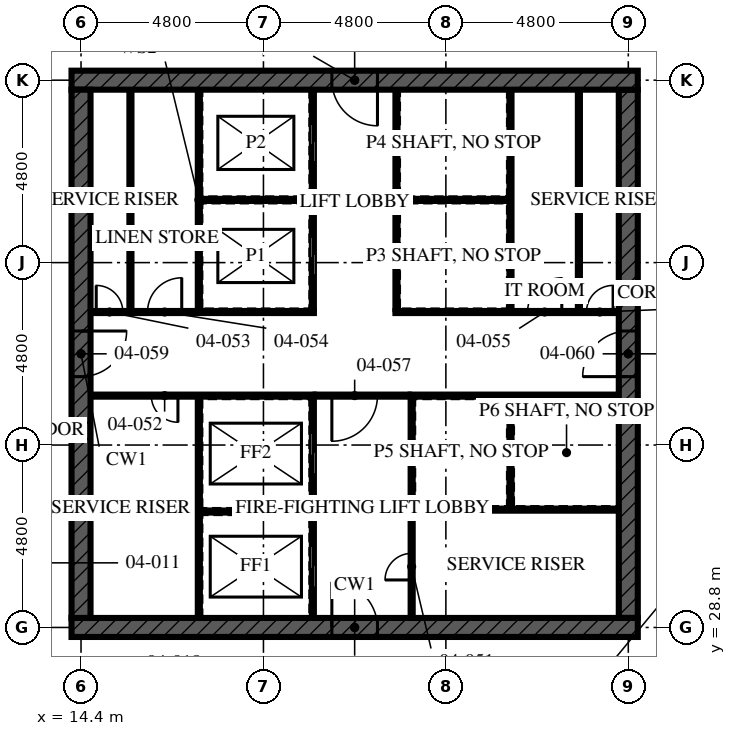
"""IFC4 building model, lengths in metres.
Left out: names, types, materials, properties, quantities, classifications, styles, units other than length and angle.
Written with IfcOpenShell. Run it as: python <this file> out.ifc"""

import sys

from ifc_helpers import new_model, si_unit, direction, frame, frame_2d, origin, place, context, subcontext, project, spatial, rectangle, extrude, element, fill, save


model = new_model("IFC4")
c1 = context("Model", 3, precision=1e-05, world=origin(), true_north=direction((0.0, 1.0)))
c2 = subcontext(c1, "Body", "Model", "MODEL_VIEW")
j1 = project(units=[si_unit("LENGTHUNIT", "METRE"), si_unit("PLANEANGLEUNIT", "RADIAN")], contexts=[c1])
p1 = place(None, origin())
s1 = spatial("IfcSite", under=j1, at=p1, CompositionType="ELEMENT")
p2 = place(p1, origin())
s2 = spatial("IfcBuilding", under=s1, at=p2, CompositionType="ELEMENT")
p3 = place(p2, frame((0.0, 0.0, 18.0)))
s3 = spatial("IfcBuildingStorey", under=s2, at=p3, CompositionType="ELEMENT", Elevation=18.0)
p4 = place(p3, frame((14.15, 28.8, -0.17), z_axis=(0.0, 0.0, 1.0), x_axis=(1.0, 0.0, 0.0)))
e1 = element("IfcWall", 1, at=p4, inside=s3, PredefinedType="SHEAR", context=c2, shape_type="SweptSolid", body=[
    extrude(rectangle(XDim=14.9, YDim=0.5, at=frame_2d((7.45, 0.0))), origin(), (0.0, 0.0, 1.0), 4.5),
])
p5 = place(p4, frame((6.85, 0.0, 0.17)))
e2 = element("IfcOpeningElement", 2, at=p5, cuts=e1, PredefinedType="OPENING", context=c2, shape_type="SweptSolid", body=[
    extrude(rectangle(XDim=1.2, YDim=2.1, at=frame_2d((0.6, 1.05))), frame((0.0, 0.26, 0.0), z_axis=(0.0, -1.0, 0.0), x_axis=(1.0, 0.0, 0.0)), (0.0, 0.0, 1.0), 0.521),
])
p6 = place(p3, frame((29.05, 43.2, -0.17), z_axis=(0.0, 0.0, 1.0), x_axis=(-1.0, 0.0, 0.0)))
e3 = element("IfcWall", 3, at=p6, inside=s3, PredefinedType="SHEAR", context=c2, shape_type="SweptSolid", body=[
    extrude(rectangle(XDim=14.9, YDim=0.5, at=frame_2d((7.45, 0.0))), origin(), (0.0, 0.0, 1.0), 4.5),
])
p7 = place(p6, frame((6.85, 0.0, 0.17)))
e4 = element("IfcOpeningElement", 4, at=p7, cuts=e3, PredefinedType="OPENING", context=c2, shape_type="SweptSolid", body=[
    extrude(rectangle(XDim=1.2, YDim=2.1, at=frame_2d((0.6, 1.05))), frame((0.0, 0.26, 0.0), z_axis=(0.0, -1.0, 0.0), x_axis=(1.0, 0.0, 0.0)), (0.0, 0.0, 1.0), 0.521),
])
p8 = place(p3, frame((14.4, 42.95, -0.17), z_axis=(0.0, 0.0, 1.0), x_axis=(0.0, -1.0, 0.0)))
e5 = element("IfcWall", 5, at=p8, inside=s3, PredefinedType="SHEAR", context=c2, shape_type="SweptSolid", body=[
    extrude(rectangle(XDim=13.9, YDim=0.5, at=frame_2d((6.95, 0.0))), origin(), (0.0, 0.0, 1.0), 4.5),
])
p9 = place(p8, frame((6.35, 0.0, 0.17)))
e6 = element("IfcOpeningElement", 6, at=p9, cuts=e5, PredefinedType="OPENING", context=c2, shape_type="SweptSolid", body=[
    extrude(rectangle(XDim=1.2, YDim=2.1, at=frame_2d((0.6, 1.05))), frame((0.0, 0.26, 0.0), z_axis=(0.0, -1.0, 0.0), x_axis=(1.0, 0.0, 0.0)), (0.0, 0.0, 1.0), 0.521),
])
p10 = place(p3, frame((28.8, 29.05, -0.17), z_axis=(0.0, 0.0, 1.0), x_axis=(0.0, 1.0, 0.0)))
e7 = element("IfcWall", 7, at=p10, inside=s3, PredefinedType="SHEAR", context=c2, shape_type="SweptSolid", body=[
    extrude(rectangle(XDim=13.9, YDim=0.5, at=frame_2d((6.95, 0.0))), origin(), (0.0, 0.0, 1.0), 4.5),
])
p11 = place(p10, frame((6.35, 0.0, 0.17)))
e8 = element("IfcOpeningElement", 8, at=p11, cuts=e7, PredefinedType="OPENING", context=c2, shape_type="SweptSolid", body=[
    extrude(rectangle(XDim=1.2, YDim=2.1, at=frame_2d((0.6, 1.05))), frame((0.0, 0.26, 0.0), z_axis=(0.0, -1.0, 0.0), x_axis=(1.0, 0.0, 0.0)), (0.0, 0.0, 1.0), 0.521),
])
for number, where, z_axis, x_axis in (
    (9, (15.7, 37.15, 0.0), (0.0, 0.0, 1.0), (0.0, 1.0, 0.0)),
    (10, (27.5, 37.15, 0.0), (0.0, 0.0, 1.0), (0.0, 1.0, 0.0)),
):
    element("IfcWall", number, at=place(p3, frame(where, z_axis=z_axis, x_axis=x_axis)), inside=s3, PredefinedType="SOLIDWALL", context=c2, shape_type="SweptSolid", body=[
        extrude(rectangle(XDim=5.8, YDim=0.1, at=frame_2d((2.9, 0.0))), origin(), (0.0, 0.0, 1.0), 4.33),
    ])
p12 = place(p3, frame((20.5, 29.05, 0.0), z_axis=(0.0, 0.0, 1.0), x_axis=(0.0, 1.0, 0.0)))
e11 = element("IfcWall", 11, at=p12, inside=s3, PredefinedType="SOLIDWALL", context=c2, shape_type="SweptSolid", body=[
    extrude(rectangle(XDim=5.8, YDim=0.1, at=frame_2d((2.9, 0.0))), origin(), (0.0, 0.0, 1.0), 4.33),
])
p13 = place(p12, frame((0.8, 0.0, 0.0)))
e12 = element("IfcOpeningElement", 12, at=p13, cuts=e11, PredefinedType="OPENING", context=c2, shape_type="SweptSolid", body=[
    extrude(rectangle(XDim=1.1, YDim=2.3, at=frame_2d((0.55, 1.15))), frame((0.0, 0.061, 0.0), z_axis=(0.0, -1.0, 0.0), x_axis=(1.0, 0.0, 0.0)), (0.0, 0.0, 1.0), 0.121),
])
p14 = place(p12, frame((3.775, 0.0, 0.0)))
e13 = element("IfcOpeningElement", 13, at=p14, cuts=e11, PredefinedType="OPENING", context=c2, shape_type="SweptSolid", body=[
    extrude(rectangle(XDim=1.1, YDim=2.3, at=frame_2d((0.55, 1.15))), frame((0.0, 0.061, 0.0), z_axis=(0.0, -1.0, 0.0), x_axis=(1.0, 0.0, 0.0)), (0.0, 0.0, 1.0), 0.121),
])
p15 = place(p3, frame((20.5, 37.15, 0.0), z_axis=(0.0, 0.0, 1.0), x_axis=(0.0, 1.0, 0.0)))
e14 = element("IfcWall", 14, at=p15, inside=s3, PredefinedType="SOLIDWALL", context=c2, shape_type="SweptSolid", body=[
    extrude(rectangle(XDim=5.8, YDim=0.1, at=frame_2d((2.9, 0.0))), origin(), (0.0, 0.0, 1.0), 4.33),
])
p16 = place(p15, frame((0.925, 0.0, 0.0)))
e15 = element("IfcOpeningElement", 15, at=p16, cuts=e14, PredefinedType="OPENING", context=c2, shape_type="SweptSolid", body=[
    extrude(rectangle(XDim=1.0, YDim=2.1, at=frame_2d((0.5, 1.05))), frame((0.0, 0.061, 0.0), z_axis=(0.0, -1.0, 0.0), x_axis=(1.0, 0.0, 0.0)), (0.0, 0.0, 1.0), 0.121),
])
p17 = place(p15, frame((3.9, 0.0, 0.0)))
e16 = element("IfcOpeningElement", 16, at=p17, cuts=e14, PredefinedType="OPENING", context=c2, shape_type="SweptSolid", body=[
    extrude(rectangle(XDim=1.0, YDim=2.1, at=frame_2d((0.5, 1.05))), frame((0.0, 0.061, 0.0), z_axis=(0.0, -1.0, 0.0), x_axis=(1.0, 0.0, 0.0)), (0.0, 0.0, 1.0), 0.121),
])
p18 = place(p3, frame((22.7, 37.15, 0.0), z_axis=(0.0, 0.0, 1.0), x_axis=(0.0, 1.0, 0.0)))
e17 = element("IfcWall", 17, at=p18, inside=s3, PredefinedType="SOLIDWALL", context=c2, shape_type="SweptSolid", body=[
    extrude(rectangle(XDim=5.8, YDim=0.1, at=frame_2d((2.9, 0.0))), origin(), (0.0, 0.0, 1.0), 4.33),
])
p19 = place(p3, frame((23.1, 29.05, 0.0), z_axis=(0.0, 0.0, 1.0), x_axis=(0.0, 1.0, 0.0)))
e18 = element("IfcWall", 18, at=p19, inside=s3, PredefinedType="SOLIDWALL", context=c2, shape_type="SweptSolid", body=[
    extrude(rectangle(XDim=5.8, YDim=0.1, at=frame_2d((2.9, 0.0))), origin(), (0.0, 0.0, 1.0), 4.33),
])
p20 = place(p19, frame((1.0, 0.0, 0.0)))
e19 = element("IfcOpeningElement", 19, at=p20, cuts=e18, PredefinedType="OPENING", context=c2, shape_type="SweptSolid", body=[
    extrude(rectangle(XDim=0.7, YDim=2.1, at=frame_2d((0.35, 1.05))), frame((0.0, 0.061, 0.0), z_axis=(0.0, -1.0, 0.0), x_axis=(1.0, 0.0, 0.0)), (0.0, 0.0, 1.0), 0.121),
])
p21 = place(p3, frame((14.65, 34.9, 0.0), z_axis=(0.0, 0.0, 1.0), x_axis=(1.0, 0.0, 0.0)))
e20 = element("IfcWall", 20, at=p21, inside=s3, PredefinedType="SOLIDWALL", context=c2, shape_type="SweptSolid", body=[
    extrude(rectangle(XDim=5.9, YDim=0.1, at=frame_2d((2.95, 0.0))), origin(), (0.0, 0.0, 1.0), 4.33),
])
p22 = place(p21, frame((1.6, 0.0, 0.0)))
e21 = element("IfcOpeningElement", 21, at=p22, cuts=e20, PredefinedType="OPENING", context=c2, shape_type="SweptSolid", body=[
    extrude(rectangle(XDim=0.7, YDim=2.1, at=frame_2d((0.35, 1.05))), frame((0.0, 0.061, 0.0), z_axis=(0.0, -1.0, 0.0), x_axis=(1.0, 0.0, 0.0)), (0.0, 0.0, 1.0), 0.121),
])
p23 = place(p3, frame((23.05, 34.9, 0.0), z_axis=(0.0, 0.0, 1.0), x_axis=(1.0, 0.0, 0.0)))
e22 = element("IfcWall", 22, at=p23, inside=s3, PredefinedType="SOLIDWALL", context=c2, shape_type="SweptSolid", body=[
    extrude(rectangle(XDim=5.5, YDim=0.1, at=frame_2d((2.75, 0.0))), origin(), (0.0, 0.0, 1.0), 4.33),
])
p24 = place(p3, frame((14.65, 37.1, 0.0), z_axis=(0.0, 0.0, 1.0), x_axis=(1.0, 0.0, 0.0)))
e23 = element("IfcWall", 23, at=p24, inside=s3, PredefinedType="SOLIDWALL", context=c2, shape_type="SweptSolid", body=[
    extrude(rectangle(XDim=5.9, YDim=0.1, at=frame_2d((2.95, 0.0))), origin(), (0.0, 0.0, 1.0), 4.33),
])
p25 = place(p24, frame((0.15, 0.0, 0.0)))
e24 = element("IfcOpeningElement", 24, at=p25, cuts=e23, PredefinedType="OPENING", context=c2, shape_type="SweptSolid", body=[
    extrude(rectangle(XDim=0.7, YDim=2.1, at=frame_2d((0.35, 1.05))), frame((0.0, 0.061, 0.0), z_axis=(0.0, -1.0, 0.0), x_axis=(1.0, 0.0, 0.0)), (0.0, 0.0, 1.0), 0.121),
])
p26 = place(p24, frame((1.5, 0.0, 0.0)))
e25 = element("IfcOpeningElement", 25, at=p26, cuts=e23, PredefinedType="OPENING", context=c2, shape_type="SweptSolid", body=[
    extrude(rectangle(XDim=0.9, YDim=2.1, at=frame_2d((0.45, 1.05))), frame((0.0, 0.061, 0.0), z_axis=(0.0, -1.0, 0.0), x_axis=(1.0, 0.0, 0.0)), (0.0, 0.0, 1.0), 0.121),
])
p27 = place(p3, frame((22.65, 37.1, 0.0), z_axis=(0.0, 0.0, 1.0), x_axis=(1.0, 0.0, 0.0)))
e26 = element("IfcWall", 26, at=p27, inside=s3, PredefinedType="SOLIDWALL", context=c2, shape_type="SweptSolid", body=[
    extrude(rectangle(XDim=5.9, YDim=0.1, at=frame_2d((2.95, 0.0))), origin(), (0.0, 0.0, 1.0), 4.33),
])
p28 = place(p27, frame((3.5, 0.0, 0.0)))
e27 = element("IfcOpeningElement", 27, at=p28, cuts=e26, PredefinedType="OPENING", context=c2, shape_type="SweptSolid", body=[
    extrude(rectangle(XDim=0.9, YDim=2.1, at=frame_2d((0.45, 1.05))), frame((0.0, 0.061, 0.0), z_axis=(0.0, -1.0, 0.0), x_axis=(1.0, 0.0, 0.0)), (0.0, 0.0, 1.0), 0.121),
])
p29 = place(p27, frame((5.05, 0.0, 0.0)))
e28 = element("IfcOpeningElement", 28, at=p29, cuts=e26, PredefinedType="OPENING", context=c2, shape_type="SweptSolid", body=[
    extrude(rectangle(XDim=0.7, YDim=2.1, at=frame_2d((0.35, 1.05))), frame((0.0, 0.061, 0.0), z_axis=(0.0, -1.0, 0.0), x_axis=(1.0, 0.0, 0.0)), (0.0, 0.0, 1.0), 0.121),
])
p30 = place(p3, frame((20.55, 34.9, 0.0), z_axis=(0.0, 0.0, 1.0), x_axis=(1.0, 0.0, 0.0)))
e29 = element("IfcWall", 29, at=p30, inside=s3, PredefinedType="SOLIDWALL", context=c2, shape_type="SweptSolid", body=[
    extrude(rectangle(XDim=2.5, YDim=0.1, at=frame_2d((1.25, 0.0))), origin(), (0.0, 0.0, 1.0), 4.33),
])
p31 = place(p30, frame((0.45, 0.0, 0.0)))
e30 = element("IfcOpeningElement", 30, at=p31, cuts=e29, PredefinedType="OPENING", context=c2, shape_type="SweptSolid", body=[
    extrude(rectangle(XDim=1.2, YDim=2.1, at=frame_2d((0.6, 1.05))), frame((0.0, 0.061, 0.0), z_axis=(0.0, -1.0, 0.0), x_axis=(1.0, 0.0, 0.0)), (0.0, 0.0, 1.0), 0.121),
])
p32 = place(p3, frame((17.5, 29.05, 0.0), z_axis=(0.0, 0.0, 1.0), x_axis=(0.0, 1.0, 0.0)))
e31 = element("IfcWall", 31, at=p32, inside=s3, PredefinedType="SOLIDWALL", context=c2, shape_type="SweptSolid", body=[
    extrude(rectangle(XDim=5.8, YDim=0.1, at=frame_2d((2.9, 0.0))), origin(), (0.0, 0.0, 1.0), 4.33),
])
p33 = place(p3, frame((17.55, 31.85, 0.0), z_axis=(0.0, 0.0, 1.0), x_axis=(1.0, 0.0, 0.0)))
e32 = element("IfcWall", 32, at=p33, inside=s3, PredefinedType="SOLIDWALL", context=c2, shape_type="SweptSolid", body=[
    extrude(rectangle(XDim=2.9, YDim=0.1, at=frame_2d((1.45, 0.0))), origin(), (0.0, 0.0, 1.0), 4.33),
])
p34 = place(p3, frame((17.5, 37.15, 0.0), z_axis=(0.0, 0.0, 1.0), x_axis=(0.0, 1.0, 0.0)))
e33 = element("IfcWall", 33, at=p34, inside=s3, PredefinedType="SOLIDWALL", context=c2, shape_type="SweptSolid", body=[
    extrude(rectangle(XDim=5.8, YDim=0.1, at=frame_2d((2.9, 0.0))), origin(), (0.0, 0.0, 1.0), 4.33),
])
for number, where, z_axis, x_axis in (
    (34, (17.55, 40.05, 0.0), (0.0, 0.0, 1.0), (1.0, 0.0, 0.0)),
    (35, (22.75, 40.05, 0.0), (0.0, 0.0, 1.0), (1.0, 0.0, 0.0)),
):
    element("IfcWall", number, at=place(p3, frame(where, z_axis=z_axis, x_axis=x_axis)), inside=s3, PredefinedType="SOLIDWALL", context=c2, shape_type="SweptSolid", body=[
        extrude(rectangle(XDim=2.9, YDim=0.1, at=frame_2d((1.45, 0.0))), origin(), (0.0, 0.0, 1.0), 4.33),
    ])
p35 = place(p3, frame((25.7, 37.15, 0.0), z_axis=(0.0, 0.0, 1.0), x_axis=(0.0, 1.0, 0.0)))
e36 = element("IfcWall", 36, at=p35, inside=s3, PredefinedType="SOLIDWALL", context=c2, shape_type="SweptSolid", body=[
    extrude(rectangle(XDim=5.8, YDim=0.1, at=frame_2d((2.9, 0.0))), origin(), (0.0, 0.0, 1.0), 4.33),
])
p36 = place(p3, frame((25.7, 31.95, 0.0), z_axis=(0.0, 0.0, 1.0), x_axis=(0.0, 1.0, 0.0)))
e37 = element("IfcWall", 37, at=p36, inside=s3, PredefinedType="SOLIDWALL", context=c2, shape_type="SweptSolid", body=[
    extrude(rectangle(XDim=2.9, YDim=0.1, at=frame_2d((1.45, 0.0))), origin(), (0.0, 0.0, 1.0), 4.33),
])
p37 = place(p3, frame((23.15, 31.9, 0.0), z_axis=(0.0, 0.0, 1.0), x_axis=(1.0, 0.0, 0.0)))
e38 = element("IfcWall", 38, at=p37, inside=s3, PredefinedType="SOLIDWALL", context=c2, shape_type="SweptSolid", body=[
    extrude(rectangle(XDim=5.4, YDim=0.1, at=frame_2d((2.7, 0.0))), origin(), (0.0, 0.0, 1.0), 4.33),
])
p38 = place(p13, origin())
e39 = element("IfcDoor", 39, at=p38, inside=s3, OperationType="SLIDING_TO_LEFT", PredefinedType="DOOR", context=c2, shape_type="SweptSolid", body=[
    extrude(rectangle(XDim=1.1, YDim=2.3, at=frame_2d((0.55, 1.15))), frame((0.0, 0.05, 0.0), z_axis=(0.0, -1.0, 0.0), x_axis=(1.0, 0.0, 0.0)), (0.0, 0.0, 1.0), 0.1),
])
fill(e12, e39)
p39 = place(p14, origin())
e40 = element("IfcDoor", 40, at=p39, inside=s3, OperationType="SLIDING_TO_LEFT", PredefinedType="DOOR", context=c2, shape_type="SweptSolid", body=[
    extrude(rectangle(XDim=1.1, YDim=2.3, at=frame_2d((0.55, 1.15))), frame((0.0, 0.05, 0.0), z_axis=(0.0, -1.0, 0.0), x_axis=(1.0, 0.0, 0.0)), (0.0, 0.0, 1.0), 0.1),
])
fill(e13, e40)
p40 = place(p16, origin())
e41 = element("IfcDoor", 41, at=p40, inside=s3, OperationType="SLIDING_TO_LEFT", PredefinedType="DOOR", context=c2, shape_type="SweptSolid", body=[
    extrude(rectangle(XDim=1.0, YDim=2.1, at=frame_2d((0.5, 1.05))), frame((0.0, 0.05, 0.0), z_axis=(0.0, -1.0, 0.0), x_axis=(1.0, 0.0, 0.0)), (0.0, 0.0, 1.0), 0.1),
])
fill(e15, e41)
p41 = place(p17, origin())
e42 = element("IfcDoor", 42, at=p41, inside=s3, OperationType="SLIDING_TO_LEFT", PredefinedType="DOOR", context=c2, shape_type="SweptSolid", body=[
    extrude(rectangle(XDim=1.0, YDim=2.1, at=frame_2d((0.5, 1.05))), frame((0.0, 0.05, 0.0), z_axis=(0.0, -1.0, 0.0), x_axis=(1.0, 0.0, 0.0)), (0.0, 0.0, 1.0), 0.1),
])
fill(e16, e42)
p42 = place(p20, origin())
e43 = element("IfcDoor", 43, at=p42, inside=s3, OperationType="SINGLE_SWING_RIGHT", PredefinedType="DOOR", context=c2, shape_type="SweptSolid", body=[
    extrude(rectangle(XDim=0.7, YDim=2.1, at=frame_2d((0.35, 1.05))), frame((0.0, 0.027, 0.0), z_axis=(0.0, -1.0, 0.0), x_axis=(1.0, 0.0, 0.0)), (0.0, 0.0, 1.0), 0.054),
])
fill(e19, e43)
p43 = place(p22, frame((0.7, 0.0, 0.0), z_axis=(0.0, 0.0, 1.0), x_axis=(-1.0, 0.0, 0.0)))
e44 = element("IfcDoor", 44, at=p43, inside=s3, OperationType="SINGLE_SWING_RIGHT", PredefinedType="DOOR", context=c2, shape_type="SweptSolid", body=[
    extrude(rectangle(XDim=0.7, YDim=2.1, at=frame_2d((0.35, 1.05))), frame((0.0, 0.027, 0.0), z_axis=(0.0, -1.0, 0.0), x_axis=(1.0, 0.0, 0.0)), (0.0, 0.0, 1.0), 0.054),
])
fill(e21, e44)
p44 = place(p25, origin())
e45 = element("IfcDoor", 45, at=p44, inside=s3, OperationType="SINGLE_SWING_RIGHT", PredefinedType="DOOR", context=c2, shape_type="SweptSolid", body=[
    extrude(rectangle(XDim=0.7, YDim=2.1, at=frame_2d((0.35, 1.05))), frame((0.0, 0.027, 0.0), z_axis=(0.0, -1.0, 0.0), x_axis=(1.0, 0.0, 0.0)), (0.0, 0.0, 1.0), 0.054),
])
fill(e24, e45)
p45 = place(p26, origin())
e46 = element("IfcDoor", 46, at=p45, inside=s3, OperationType="SINGLE_SWING_LEFT", PredefinedType="DOOR", context=c2, shape_type="SweptSolid", body=[
    extrude(rectangle(XDim=0.9, YDim=2.1, at=frame_2d((0.45, 1.05))), frame((0.0, 0.027, 0.0), z_axis=(0.0, -1.0, 0.0), x_axis=(1.0, 0.0, 0.0)), (0.0, 0.0, 1.0), 0.054),
])
fill(e25, e46)
p46 = place(p28, origin())
e47 = element("IfcDoor", 47, at=p46, inside=s3, OperationType="SINGLE_SWING_LEFT", PredefinedType="DOOR", context=c2, shape_type="SweptSolid", body=[
    extrude(rectangle(XDim=0.9, YDim=2.1, at=frame_2d((0.45, 1.05))), frame((0.0, 0.027, 0.0), z_axis=(0.0, -1.0, 0.0), x_axis=(1.0, 0.0, 0.0)), (0.0, 0.0, 1.0), 0.054),
])
fill(e27, e47)
p47 = place(p29, origin())
e48 = element("IfcDoor", 48, at=p47, inside=s3, OperationType="SINGLE_SWING_LEFT", PredefinedType="DOOR", context=c2, shape_type="SweptSolid", body=[
    extrude(rectangle(XDim=0.7, YDim=2.1, at=frame_2d((0.35, 1.05))), frame((0.0, 0.027, 0.0), z_axis=(0.0, -1.0, 0.0), x_axis=(1.0, 0.0, 0.0)), (0.0, 0.0, 1.0), 0.054),
])
fill(e28, e48)
p48 = place(p31, frame((1.2, 0.0, 0.0), z_axis=(0.0, 0.0, 1.0), x_axis=(-1.0, 0.0, 0.0)))
e49 = element("IfcDoor", 49, at=p48, inside=s3, OperationType="SINGLE_SWING_LEFT", PredefinedType="DOOR", context=c2, shape_type="SweptSolid", body=[
    extrude(rectangle(XDim=1.2, YDim=2.1, at=frame_2d((0.6, 1.05))), frame((0.0, 0.027, 0.0), z_axis=(0.0, -1.0, 0.0), x_axis=(1.0, 0.0, 0.0)), (0.0, 0.0, 1.0), 0.054),
])
fill(e30, e49)
p49 = place(p5, origin())
e50 = element("IfcDoor", 50, at=p49, inside=s3, OperationType="SINGLE_SWING_LEFT", PredefinedType="DOOR", context=c2, shape_type="SweptSolid", body=[
    extrude(rectangle(XDim=1.2, YDim=2.1, at=frame_2d((0.6, 1.05))), frame((0.0, 0.027, 0.0), z_axis=(0.0, -1.0, 0.0), x_axis=(1.0, 0.0, 0.0)), (0.0, 0.0, 1.0), 0.054),
])
fill(e2, e50)
p50 = place(p9, origin())
e51 = element("IfcDoor", 51, at=p50, inside=s3, OperationType="SINGLE_SWING_LEFT", PredefinedType="DOOR", context=c2, shape_type="SweptSolid", body=[
    extrude(rectangle(XDim=1.2, YDim=2.1, at=frame_2d((0.6, 1.05))), frame((0.0, 0.027, 0.0), z_axis=(0.0, -1.0, 0.0), x_axis=(1.0, 0.0, 0.0)), (0.0, 0.0, 1.0), 0.054),
])
fill(e6, e51)
p51 = place(p11, origin())
e52 = element("IfcDoor", 52, at=p51, inside=s3, OperationType="SINGLE_SWING_LEFT", PredefinedType="DOOR", context=c2, shape_type="SweptSolid", body=[
    extrude(rectangle(XDim=1.2, YDim=2.1, at=frame_2d((0.6, 1.05))), frame((0.0, 0.027, 0.0), z_axis=(0.0, -1.0, 0.0), x_axis=(1.0, 0.0, 0.0)), (0.0, 0.0, 1.0), 0.054),
])
fill(e8, e52)
p52 = place(p7, origin())
e53 = element("IfcDoor", 53, at=p52, inside=s3, OperationType="SINGLE_SWING_LEFT", PredefinedType="DOOR", context=c2, shape_type="SweptSolid", body=[
    extrude(rectangle(XDim=1.2, YDim=2.1, at=frame_2d((0.6, 1.05))), frame((0.0, 0.027, 0.0), z_axis=(0.0, -1.0, 0.0), x_axis=(1.0, 0.0, 0.0)), (0.0, 0.0, 1.0), 0.054),
])
fill(e4, e53)
save(model, sys.argv[1])
